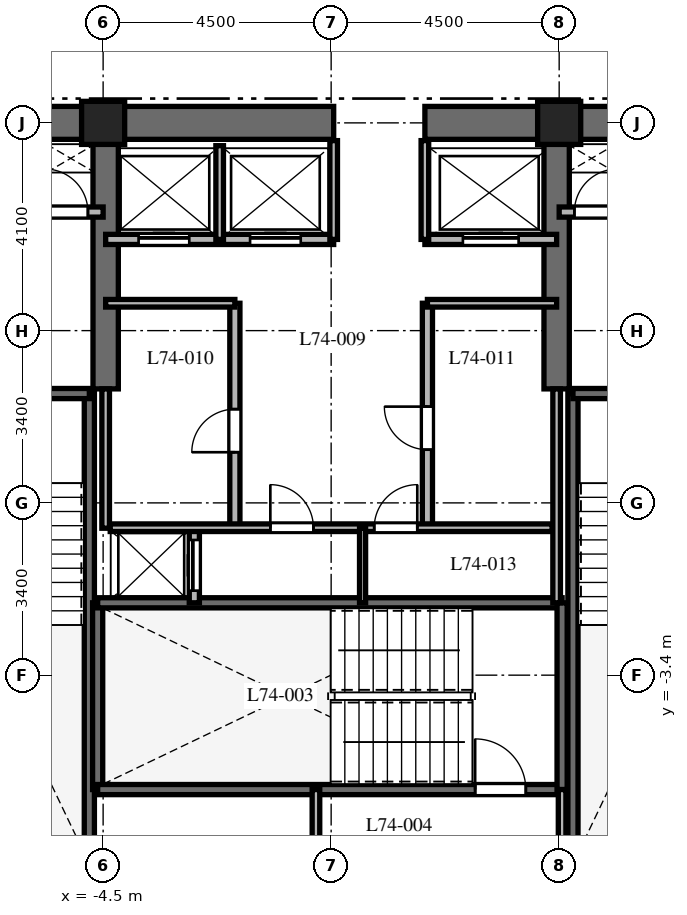
"""IFC4 building model, lengths in metres.
Left out: names, types, materials, properties, quantities, classifications, styles, units other than length and angle.
Written with IfcOpenShell. Run it as: python <this file> out.ifc"""

import sys

from ifc_helpers import new_model, si_unit, direction, frame, frame_2d, origin, origin_2d, place, context, subcontext, project, spatial, rectangle, extrude, element, fill, save


model = new_model("IFC4")
c1 = context("Model", 3, precision=1e-05, world=origin(), true_north=direction((0.0, 1.0)))
c2 = subcontext(c1, "Body", "Model", "MODEL_VIEW")
j1 = project(units=[si_unit("LENGTHUNIT", "METRE"), si_unit("PLANEANGLEUNIT", "RADIAN")], contexts=[c1])
p1 = place(None, origin())
s1 = spatial("IfcSite", under=j1, at=p1, CompositionType="ELEMENT")
p2 = place(p1, origin())
s2 = spatial("IfcBuilding", under=s1, at=p2, CompositionType="ELEMENT")
p3 = place(p2, frame((0.0, 0.0, 297.6)))
s3 = spatial("IfcBuildingStorey", under=s2, at=p3, CompositionType="ELEMENT", Elevation=297.6)
p4 = place(p3, frame((-9.325, 7.5, 0.0), z_axis=(0.0, 0.0, 1.0), x_axis=(1.0, 0.0, 0.0)))
e1 = element("IfcWall", 1, at=p4, inside=s3, PredefinedType="SHEAR", context=c2, shape_type="SweptSolid", body=[
    extrude(rectangle(XDim=9.375, YDim=0.65, at=frame_2d((4.688, 0.0))), origin(), (0.0, 0.0, 1.0), 3.9),
])
p5 = place(p3, frame((1.85, 7.5, 0.0), z_axis=(0.0, 0.0, 1.0), x_axis=(1.0, 0.0, 0.0)))
e2 = element("IfcWall", 2, at=p5, inside=s3, PredefinedType="SHEAR", context=c2, shape_type="SweptSolid", body=[
    extrude(rectangle(XDim=7.475, YDim=0.65, at=frame_2d((3.737, 0.0))), origin(), (0.0, 0.0, 1.0), 3.9),
])
for number, where, z_axis, x_axis in (
    (3, (-4.45, 2.25, 0.0), (0.0, 0.0, 1.0), (0.0, 1.0, 0.0)),
    (4, (4.45, 2.25, 0.0), (0.0, 0.0, 1.0), (0.0, 1.0, 0.0)),
):
    element("IfcWall", number, at=place(p3, frame(where, z_axis=z_axis, x_axis=x_axis)), inside=s3, PredefinedType="SHEAR", context=c2, shape_type="SweptSolid", body=[
        extrude(rectangle(XDim=4.925, YDim=0.5, at=frame_2d((2.462, 0.0))), origin(), (0.0, 0.0, 1.0), 3.9),
    ])
p6 = place(p3, frame((-4.772, -6.985, 0.0), z_axis=(0.0, 0.0, 1.0), x_axis=(0.0, 1.0, 0.0)))
e5 = element("IfcWall", 5, at=p6, inside=s3, PredefinedType="SHEAR", context=c2, shape_type="SweptSolid", body=[
    extrude(rectangle(XDim=9.143, YDim=0.2, at=frame_2d((4.572, 0.0))), origin(), (0.0, 0.0, 1.0), 3.9),
])
p7 = place(p3, frame((-8.458, 2.158, 0.0), z_axis=(0.0, 0.0, 1.0), x_axis=(1.0, 0.0, 0.0)))
e6 = element("IfcWall", 6, at=p7, inside=s3, PredefinedType="SHEAR", context=c2, shape_type="SweptSolid", body=[
    extrude(rectangle(XDim=3.686, YDim=0.2, at=frame_2d((1.843, 0.0))), origin(), (0.0, 0.0, 1.0), 3.9),
])
p8 = place(p7, frame((1.3, 0.0, 0.0)))
e7 = element("IfcOpeningElement", 7, at=p8, cuts=e6, PredefinedType="OPENING", context=c2, shape_type="SweptSolid", body=[
    extrude(rectangle(XDim=1.0, YDim=2.15, at=frame_2d((0.5, 1.075))), frame((0.0, 0.11, 0.0), z_axis=(0.0, -1.0, 0.0), x_axis=(1.0, 0.0, 0.0)), (0.0, 0.0, 1.0), 0.22),
])
p9 = place(p3, frame((4.772, -6.985, 0.0), z_axis=(0.0, 0.0, 1.0), x_axis=(0.0, 1.0, 0.0)))
e8 = element("IfcWall", 8, at=p9, inside=s3, PredefinedType="SHEAR", context=c2, shape_type="SweptSolid", body=[
    extrude(rectangle(XDim=9.143, YDim=0.2, at=frame_2d((4.572, 0.0))), origin(), (0.0, 0.0, 1.0), 3.9),
])
p10 = place(p3, frame((4.772, 2.158, 0.0), z_axis=(0.0, 0.0, 1.0), x_axis=(1.0, 0.0, 0.0)))
e9 = element("IfcWall", 9, at=p10, inside=s3, PredefinedType="SHEAR", context=c2, shape_type="SweptSolid", body=[
    extrude(rectangle(XDim=3.686, YDim=0.2, at=frame_2d((1.843, 0.0))), origin(), (0.0, 0.0, 1.0), 3.9),
])
p11 = place(p10, frame((1.35, 0.0, 0.0)))
e10 = element("IfcOpeningElement", 10, at=p11, cuts=e9, PredefinedType="OPENING", context=c2, shape_type="SweptSolid", body=[
    extrude(rectangle(XDim=1.0, YDim=2.15, at=frame_2d((0.5, 1.075))), frame((0.0, 0.11, 0.0), z_axis=(0.0, -1.0, 0.0), x_axis=(1.0, 0.0, 0.0)), (0.0, 0.0, 1.0), 0.22),
])
p12 = place(p3, frame((-4.608, -5.658, 0.0), z_axis=(0.0, 0.0, 1.0), x_axis=(0.0, 1.0, 0.0)))
e11 = element("IfcWall", 11, at=p12, inside=s3, PredefinedType="SHEAR", context=c2, shape_type="SweptSolid", body=[
    extrude(rectangle(XDim=3.686, YDim=0.2, at=frame_2d((1.843, 0.0))), origin(), (0.0, 0.0, 1.0), 3.9),
])
p13 = place(p3, frame((-4.608, -5.658, 0.0), z_axis=(0.0, 0.0, 1.0), x_axis=(1.0, 0.0, 0.0)))
e12 = element("IfcWall", 12, at=p13, inside=s3, PredefinedType="SHEAR", context=c2, shape_type="SweptSolid", body=[
    extrude(rectangle(XDim=9.166, YDim=0.2, at=frame_2d((4.583, 0.0))), origin(), (0.0, 0.0, 1.0), 3.9),
])
p14 = place(p13, frame((7.45, 0.0, 0.0)))
e13 = element("IfcOpeningElement", 13, at=p14, cuts=e12, PredefinedType="OPENING", context=c2, shape_type="SweptSolid", body=[
    extrude(rectangle(XDim=1.0, YDim=2.15, at=frame_2d((0.5, 1.075))), frame((0.0, 0.11, 0.0), z_axis=(0.0, -1.0, 0.0), x_axis=(1.0, 0.0, 0.0)), (0.0, 0.0, 1.0), 0.22),
])
p15 = place(p3, frame((-4.608, -1.972, 0.0), z_axis=(0.0, 0.0, 1.0), x_axis=(1.0, 0.0, 0.0)))
e14 = element("IfcWall", 14, at=p15, inside=s3, PredefinedType="SHEAR", context=c2, shape_type="SweptSolid", body=[
    extrude(rectangle(XDim=9.166, YDim=0.2, at=frame_2d((4.583, 0.0))), origin(), (0.0, 0.0, 1.0), 3.9),
])
p16 = place(p3, frame((4.558, -5.658, 0.0), z_axis=(0.0, 0.0, 1.0), x_axis=(0.0, 1.0, 0.0)))
e15 = element("IfcWall", 15, at=p16, inside=s3, PredefinedType="SHEAR", context=c2, shape_type="SweptSolid", body=[
    extrude(rectangle(XDim=3.686, YDim=0.2, at=frame_2d((1.843, 0.0))), origin(), (0.0, 0.0, 1.0), 3.9),
])
for number, where, z_axis, x_axis in (
    (16, (4.5, 7.5, 0.0), (0.0, 0.0, 1.0), (1.0, 0.0, 0.0)),
    (17, (-4.5, 7.5, 0.0), (0.0, 0.0, 1.0), (1.0, 0.0, 0.0)),
):
    element("IfcColumn", number, at=place(p3, frame(where, z_axis=z_axis, x_axis=x_axis)), inside=s3, PredefinedType="COLUMN", context=c2, shape_type="SweptSolid", body=[
        extrude(rectangle(XDim=0.85, YDim=0.85, at=origin_2d()), origin(), (0.0, 0.0, 1.0), 3.9),
    ])
for number, where, z_axis, x_axis in (
    (18, (-0.3, -7.02, 0.0), (0.0, 0.0, 1.0), (0.0, 1.0, 0.0)),
    (19, (4.558, -7.02, 0.0), (0.0, 0.0, 1.0), (0.0, 1.0, 0.0)),
):
    element("IfcWall", number, at=place(p3, frame(where, z_axis=z_axis, x_axis=x_axis)), inside=s3, PredefinedType="PARTITIONING", context=c2, shape_type="SweptSolid", body=[
        extrude(rectangle(XDim=1.362, YDim=0.15, at=frame_2d((0.681, 0.0))), origin(), (0.0, 0.0, 1.0), 3.6),
    ])
p17 = place(p3, frame((-8.55, 5.74, 0.0), z_axis=(0.0, 0.0, 1.0), x_axis=(1.0, 0.0, 0.0)))
e20 = element("IfcWall", 20, at=p17, inside=s3, PredefinedType="PARTITIONING", context=c2, shape_type="SweptSolid", body=[
    extrude(rectangle(XDim=4.05, YDim=0.2, at=frame_2d((2.025, 0.0))), origin(), (0.0, 0.0, 1.0), 3.6),
])
p18 = place(p17, frame((0.75, 0.0, 0.0)))
e21 = element("IfcOpeningElement", 21, at=p18, cuts=e20, PredefinedType="OPENING", context=c2, shape_type="SweptSolid", body=[
    extrude(rectangle(XDim=1.1, YDim=2.2, at=frame_2d((0.55, 1.1))), frame((0.0, 0.11, 0.0), z_axis=(0.0, -1.0, 0.0), x_axis=(1.0, 0.0, 0.0)), (0.0, 0.0, 1.0), 0.22),
])
p19 = place(p17, frame((2.9, 0.0, 0.0)))
e22 = element("IfcOpeningElement", 22, at=p19, cuts=e20, PredefinedType="OPENING", context=c2, shape_type="SweptSolid", body=[
    extrude(rectangle(XDim=0.85, YDim=2.03, at=frame_2d((0.425, 1.015))), frame((0.0, 0.11, 0.0), z_axis=(0.0, -1.0, 0.0), x_axis=(1.0, 0.0, 0.0)), (0.0, 0.0, 1.0), 0.22),
])
p20 = place(p3, frame((4.5, 5.74, 0.0), z_axis=(0.0, 0.0, 1.0), x_axis=(1.0, 0.0, 0.0)))
e23 = element("IfcWall", 23, at=p20, inside=s3, PredefinedType="PARTITIONING", context=c2, shape_type="SweptSolid", body=[
    extrude(rectangle(XDim=4.05, YDim=0.2, at=frame_2d((2.025, 0.0))), origin(), (0.0, 0.0, 1.0), 3.6),
])
p21 = place(p20, frame((0.3, 0.0, 0.0)))
e24 = element("IfcOpeningElement", 24, at=p21, cuts=e23, PredefinedType="OPENING", context=c2, shape_type="SweptSolid", body=[
    extrude(rectangle(XDim=0.85, YDim=2.03, at=frame_2d((0.425, 1.015))), frame((0.0, 0.11, 0.0), z_axis=(0.0, -1.0, 0.0), x_axis=(1.0, 0.0, 0.0)), (0.0, 0.0, 1.0), 0.22),
])
p22 = place(p20, frame((2.15, 0.0, 0.0)))
e25 = element("IfcOpeningElement", 25, at=p22, cuts=e23, PredefinedType="OPENING", context=c2, shape_type="SweptSolid", body=[
    extrude(rectangle(XDim=1.1, YDim=2.2, at=frame_2d((0.55, 1.1))), frame((0.0, 0.11, 0.0), z_axis=(0.0, -1.0, 0.0), x_axis=(1.0, 0.0, 0.0)), (0.0, 0.0, 1.0), 0.22),
])
p23 = place(p3, frame((-2.7, -1.972, 0.0), z_axis=(0.0, 0.0, 1.0), x_axis=(0.0, 1.0, 0.0)))
e26 = element("IfcWall", 26, at=p23, inside=s3, PredefinedType="PARTITIONING", context=c2, shape_type="SweptSolid", body=[
    extrude(rectangle(XDim=1.472, YDim=0.2, at=frame_2d((0.736, 0.0))), origin(), (0.0, 0.0, 1.0), 3.6),
])
p24 = place(p23, frame((0.24, 0.0, 0.0)))
e27 = element("IfcOpeningElement", 27, at=p24, cuts=e26, PredefinedType="OPENING", context=c2, shape_type="SweptSolid", body=[
    extrude(rectangle(XDim=1.0, YDim=2.2, at=frame_2d((0.5, 1.1))), frame((0.0, 0.11, 0.0), z_axis=(0.0, -1.0, 0.0), x_axis=(1.0, 0.0, 0.0)), (0.0, 0.0, 1.0), 0.22),
])
p25 = place(p3, frame((-4.45, 5.2, 0.0), z_axis=(0.0, 0.0, 1.0), x_axis=(1.0, 0.0, 0.0)))
e28 = element("IfcWall", 28, at=p25, inside=s3, PredefinedType="PARTITIONING", context=c2, shape_type="SweptSolid", body=[
    extrude(rectangle(XDim=4.5, YDim=0.2, at=frame_2d((2.25, 0.0))), origin(), (0.0, 0.0, 1.0), 3.6),
])
p26 = place(p25, frame((0.65, 0.0, 0.0)))
e29 = element("IfcOpeningElement", 29, at=p26, cuts=e28, PredefinedType="OPENING", context=c2, shape_type="SweptSolid", body=[
    extrude(rectangle(XDim=1.0, YDim=2.2, at=frame_2d((0.5, 1.1))), frame((0.0, 0.11, 0.0), z_axis=(0.0, -1.0, 0.0), x_axis=(1.0, 0.0, 0.0)), (0.0, 0.0, 1.0), 0.22),
])
p27 = place(p25, frame((2.85, 0.0, 0.0)))
e30 = element("IfcOpeningElement", 30, at=p27, cuts=e28, PredefinedType="OPENING", context=c2, shape_type="SweptSolid", body=[
    extrude(rectangle(XDim=1.0, YDim=2.2, at=frame_2d((0.5, 1.1))), frame((0.0, 0.11, 0.0), z_axis=(0.0, -1.0, 0.0), x_axis=(1.0, 0.0, 0.0)), (0.0, 0.0, 1.0), 0.22),
])
p28 = place(p3, frame((1.85, 5.2, 0.0), z_axis=(0.0, 0.0, 1.0), x_axis=(1.0, 0.0, 0.0)))
e31 = element("IfcWall", 31, at=p28, inside=s3, PredefinedType="PARTITIONING", context=c2, shape_type="SweptSolid", body=[
    extrude(rectangle(XDim=2.6, YDim=0.2, at=frame_2d((1.3, 0.0))), origin(), (0.0, 0.0, 1.0), 3.6),
])
p29 = place(p28, frame((0.75, 0.0, 0.0)))
e32 = element("IfcOpeningElement", 32, at=p29, cuts=e31, PredefinedType="OPENING", context=c2, shape_type="SweptSolid", body=[
    extrude(rectangle(XDim=1.1, YDim=2.2, at=frame_2d((0.55, 1.1))), frame((0.0, 0.11, 0.0), z_axis=(0.0, -1.0, 0.0), x_axis=(1.0, 0.0, 0.0)), (0.0, 0.0, 1.0), 0.22),
])
p30 = place(p3, frame((-2.2, 5.2, 0.0), z_axis=(0.0, 0.0, 1.0), x_axis=(0.0, 1.0, 0.0)))
e33 = element("IfcWall", 33, at=p30, inside=s3, PredefinedType="PARTITIONING", context=c2, shape_type="SweptSolid", body=[
    extrude(rectangle(XDim=1.85, YDim=0.15, at=frame_2d((0.925, 0.0))), origin(), (0.0, 0.0, 1.0), 3.6),
])
for number, where, z_axis, x_axis in (
    (34, (0.05, 5.2, 0.0), (0.0, 0.0, 1.0), (0.0, 1.0, 0.0)),
    (35, (1.85, 5.2, 0.0), (0.0, 0.0, 1.0), (0.0, 1.0, 0.0)),
):
    element("IfcWall", number, at=place(p3, frame(where, z_axis=z_axis, x_axis=x_axis)), inside=s3, PredefinedType="PARTITIONING", context=c2, shape_type="SweptSolid", body=[
        extrude(rectangle(XDim=1.95, YDim=0.15, at=frame_2d((0.975, 0.0))), origin(), (0.0, 0.0, 1.0), 3.6),
    ])
p31 = place(p3, frame((-4.45, -0.5, 0.0), z_axis=(0.0, 0.0, 1.0), x_axis=(0.0, 1.0, 0.0)))
e36 = element("IfcWall", 36, at=p31, inside=s3, PredefinedType="PARTITIONING", context=c2, shape_type="SweptSolid", body=[
    extrude(rectangle(XDim=2.75, YDim=0.15, at=frame_2d((1.375, 0.0))), origin(), (0.0, 0.0, 1.0), 3.6),
])
p32 = place(p3, frame((4.45, -1.972, 0.0), z_axis=(0.0, 0.0, 1.0), x_axis=(0.0, 1.0, 0.0)))
e37 = element("IfcWall", 37, at=p32, inside=s3, PredefinedType="PARTITIONING", context=c2, shape_type="SweptSolid", body=[
    extrude(rectangle(XDim=4.222, YDim=0.15, at=frame_2d((2.111, 0.0))), origin(), (0.0, 0.0, 1.0), 3.6),
])
p33 = place(p3, frame((-1.9, -0.5, 0.0), z_axis=(0.0, 0.0, 1.0), x_axis=(0.0, 1.0, 0.0)))
e38 = element("IfcWall", 38, at=p33, inside=s3, PredefinedType="PARTITIONING", context=c2, shape_type="SweptSolid", body=[
    extrude(rectangle(XDim=4.44, YDim=0.2, at=frame_2d((2.22, 0.0))), origin(), (0.0, 0.0, 1.0), 3.6),
])
p34 = place(p33, frame((1.5, 0.0, 0.0)))
e39 = element("IfcOpeningElement", 39, at=p34, cuts=e38, PredefinedType="OPENING", context=c2, shape_type="SweptSolid", body=[
    extrude(rectangle(XDim=0.85, YDim=2.03, at=frame_2d((0.425, 1.015))), frame((0.0, 0.11, 0.0), z_axis=(0.0, -1.0, 0.0), x_axis=(1.0, 0.0, 0.0)), (0.0, 0.0, 1.0), 0.22),
])
p35 = place(p3, frame((-4.45, 3.94, 0.0), z_axis=(0.0, 0.0, 1.0), x_axis=(1.0, 0.0, 0.0)))
e40 = element("IfcWall", 40, at=p35, inside=s3, PredefinedType="PARTITIONING", context=c2, shape_type="SweptSolid", body=[
    extrude(rectangle(XDim=2.55, YDim=0.15, at=frame_2d((1.275, 0.0))), origin(), (0.0, 0.0, 1.0), 3.6),
])
p36 = place(p3, frame((1.9, -0.5, 0.0), z_axis=(0.0, 0.0, 1.0), x_axis=(0.0, 1.0, 0.0)))
e41 = element("IfcWall", 41, at=p36, inside=s3, PredefinedType="PARTITIONING", context=c2, shape_type="SweptSolid", body=[
    extrude(rectangle(XDim=4.44, YDim=0.2, at=frame_2d((2.22, 0.0))), origin(), (0.0, 0.0, 1.0), 3.6),
])
p37 = place(p36, frame((1.55, 0.0, 0.0)))
e42 = element("IfcOpeningElement", 42, at=p37, cuts=e41, PredefinedType="OPENING", context=c2, shape_type="SweptSolid", body=[
    extrude(rectangle(XDim=0.85, YDim=2.03, at=frame_2d((0.425, 1.015))), frame((0.0, 0.11, 0.0), z_axis=(0.0, -1.0, 0.0), x_axis=(1.0, 0.0, 0.0)), (0.0, 0.0, 1.0), 0.22),
])
p38 = place(p3, frame((1.9, 3.94, 0.0), z_axis=(0.0, 0.0, 1.0), x_axis=(1.0, 0.0, 0.0)))
e43 = element("IfcWall", 43, at=p38, inside=s3, PredefinedType="PARTITIONING", context=c2, shape_type="SweptSolid", body=[
    extrude(rectangle(XDim=2.55, YDim=0.15, at=frame_2d((1.275, 0.0))), origin(), (0.0, 0.0, 1.0), 3.6),
])
p39 = place(p3, frame((-4.36, -0.49, 0.0), z_axis=(0.0, 0.0, 1.0), x_axis=(1.0, 0.0, 0.0)))
e44 = element("IfcWall", 44, at=p39, inside=s3, PredefinedType="PARTITIONING", context=c2, shape_type="SweptSolid", body=[
    extrude(rectangle(XDim=8.72, YDim=0.15, at=frame_2d((4.36, 0.0))), origin(), (0.0, 0.0, 1.0), 3.6),
])
p40 = place(p39, frame((3.16, 0.0, 0.0)))
e45 = element("IfcOpeningElement", 45, at=p40, cuts=e44, PredefinedType="OPENING", context=c2, shape_type="SweptSolid", body=[
    extrude(rectangle(XDim=0.85, YDim=2.03, at=frame_2d((0.425, 1.015))), frame((0.0, 0.085, 0.0), z_axis=(0.0, -1.0, 0.0), x_axis=(1.0, 0.0, 0.0)), (0.0, 0.0, 1.0), 0.17),
])
p41 = place(p39, frame((5.21, 0.0, 0.0)))
e46 = element("IfcOpeningElement", 46, at=p41, cuts=e44, PredefinedType="OPENING", context=c2, shape_type="SweptSolid", body=[
    extrude(rectangle(XDim=0.85, YDim=2.03, at=frame_2d((0.425, 1.015))), frame((0.0, 0.085, 0.0), z_axis=(0.0, -1.0, 0.0), x_axis=(1.0, 0.0, 0.0)), (0.0, 0.0, 1.0), 0.17),
])
p42 = place(p3, frame((0.62, -1.972, 0.0), z_axis=(0.0, 0.0, 1.0), x_axis=(0.0, 1.0, 0.0)))
e47 = element("IfcWall", 47, at=p42, inside=s3, PredefinedType="PARTITIONING", context=c2, shape_type="SweptSolid", body=[
    extrude(rectangle(XDim=1.472, YDim=0.12, at=frame_2d((0.736, 0.0))), origin(), (0.0, 0.0, 1.0), 3.6),
])
p43 = place(p14, origin())
e48 = element("IfcDoor", 48, at=p43, inside=s3, OperationType="SINGLE_SWING_LEFT", PredefinedType="DOOR", context=c2, shape_type="SweptSolid", body=[
    extrude(rectangle(XDim=1.0, YDim=2.15, at=frame_2d((0.5, 1.075))), frame((0.0, 0.025, 0.0), z_axis=(0.0, -1.0, 0.0), x_axis=(1.0, 0.0, 0.0)), (0.0, 0.0, 1.0), 0.05),
])
fill(e13, e48)
p44 = place(p19, origin())
e49 = element("IfcDoor", 49, at=p44, inside=s3, OperationType="SINGLE_SWING_LEFT", PredefinedType="DOOR", context=c2, shape_type="SweptSolid", body=[
    extrude(rectangle(XDim=0.85, YDim=2.03, at=frame_2d((0.425, 1.015))), frame((0.0, 0.025, 0.0), z_axis=(0.0, -1.0, 0.0), x_axis=(1.0, 0.0, 0.0)), (0.0, 0.0, 1.0), 0.05),
])
fill(e22, e49)
p45 = place(p21, origin())
e50 = element("IfcDoor", 50, at=p45, inside=s3, OperationType="SINGLE_SWING_RIGHT", PredefinedType="DOOR", context=c2, shape_type="SweptSolid", body=[
    extrude(rectangle(XDim=0.85, YDim=2.03, at=frame_2d((0.425, 1.015))), frame((0.0, 0.025, 0.0), z_axis=(0.0, -1.0, 0.0), x_axis=(1.0, 0.0, 0.0)), (0.0, 0.0, 1.0), 0.05),
])
fill(e24, e50)
p46 = place(p24, origin())
e51 = element("IfcDoor", 51, at=p46, inside=s3, OperationType="SLIDING_TO_LEFT", PredefinedType="DOOR", context=c2, shape_type="SweptSolid", body=[
    extrude(rectangle(XDim=1.0, YDim=2.2, at=frame_2d((0.5, 1.1))), frame((0.0, 0.025, 0.0), z_axis=(0.0, -1.0, 0.0), x_axis=(1.0, 0.0, 0.0)), (0.0, 0.0, 1.0), 0.05),
])
fill(e27, e51)
p47 = place(p26, origin())
e52 = element("IfcDoor", 52, at=p47, inside=s3, OperationType="SLIDING_TO_LEFT", PredefinedType="DOOR", context=c2, shape_type="SweptSolid", body=[
    extrude(rectangle(XDim=1.0, YDim=2.2, at=frame_2d((0.5, 1.1))), frame((0.0, 0.025, 0.0), z_axis=(0.0, -1.0, 0.0), x_axis=(1.0, 0.0, 0.0)), (0.0, 0.0, 1.0), 0.05),
])
fill(e29, e52)
p48 = place(p27, origin())
e53 = element("IfcDoor", 53, at=p48, inside=s3, OperationType="SLIDING_TO_RIGHT", PredefinedType="DOOR", context=c2, shape_type="SweptSolid", body=[
    extrude(rectangle(XDim=1.0, YDim=2.2, at=frame_2d((0.5, 1.1))), frame((0.0, 0.025, 0.0), z_axis=(0.0, -1.0, 0.0), x_axis=(1.0, 0.0, 0.0)), (0.0, 0.0, 1.0), 0.05),
])
fill(e30, e53)
p49 = place(p29, origin())
e54 = element("IfcDoor", 54, at=p49, inside=s3, OperationType="SLIDING_TO_RIGHT", PredefinedType="DOOR", context=c2, shape_type="SweptSolid", body=[
    extrude(rectangle(XDim=1.1, YDim=2.2, at=frame_2d((0.55, 1.1))), frame((0.0, 0.025, 0.0), z_axis=(0.0, -1.0, 0.0), x_axis=(1.0, 0.0, 0.0)), (0.0, 0.0, 1.0), 0.05),
])
fill(e32, e54)
p50 = place(p34, origin())
e55 = element("IfcDoor", 55, at=p50, inside=s3, OperationType="SINGLE_SWING_LEFT", PredefinedType="DOOR", context=c2, shape_type="SweptSolid", body=[
    extrude(rectangle(XDim=0.85, YDim=2.03, at=frame_2d((0.425, 1.015))), frame((0.0, 0.025, 0.0), z_axis=(0.0, -1.0, 0.0), x_axis=(1.0, 0.0, 0.0)), (0.0, 0.0, 1.0), 0.05),
])
fill(e39, e55)
p51 = place(p37, origin())
e56 = element("IfcDoor", 56, at=p51, inside=s3, OperationType="SINGLE_SWING_RIGHT", PredefinedType="DOOR", context=c2, shape_type="SweptSolid", body=[
    extrude(rectangle(XDim=0.85, YDim=2.03, at=frame_2d((0.425, 1.015))), frame((0.0, 0.025, 0.0), z_axis=(0.0, -1.0, 0.0), x_axis=(1.0, 0.0, 0.0)), (0.0, 0.0, 1.0), 0.05),
])
fill(e42, e56)
p52 = place(p40, origin())
e57 = element("IfcDoor", 57, at=p52, inside=s3, OperationType="SINGLE_SWING_LEFT", PredefinedType="DOOR", context=c2, shape_type="SweptSolid", body=[
    extrude(rectangle(XDim=0.85, YDim=2.03, at=frame_2d((0.425, 1.015))), frame((0.0, 0.025, 0.0), z_axis=(0.0, -1.0, 0.0), x_axis=(1.0, 0.0, 0.0)), (0.0, 0.0, 1.0), 0.05),
])
fill(e45, e57)
p53 = place(p41, origin())
e58 = element("IfcDoor", 58, at=p53, inside=s3, OperationType="SINGLE_SWING_RIGHT", PredefinedType="DOOR", context=c2, shape_type="SweptSolid", body=[
    extrude(rectangle(XDim=0.85, YDim=2.03, at=frame_2d((0.425, 1.015))), frame((0.0, 0.025, 0.0), z_axis=(0.0, -1.0, 0.0), x_axis=(1.0, 0.0, 0.0)), (0.0, 0.0, 1.0), 0.05),
])
fill(e46, e58)
save(model, sys.argv[1])
